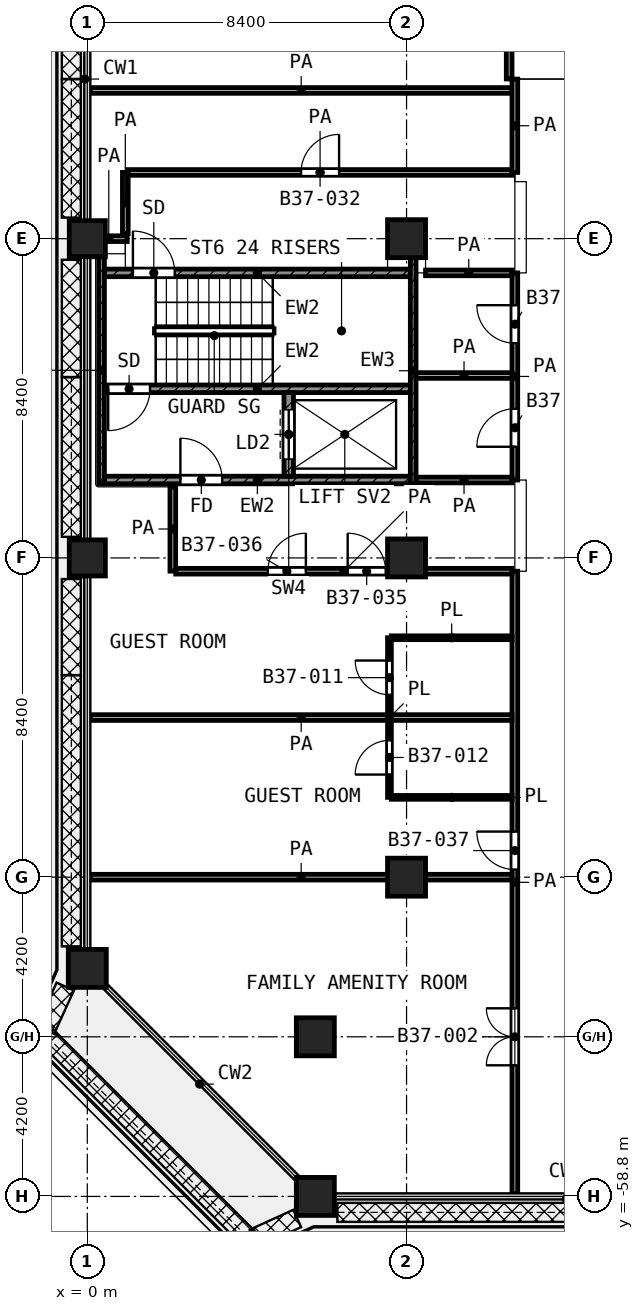
"""IFC4 building model, lengths in metres.
Left out: names, types, materials, properties, quantities, classifications, styles, units other than length and angle.
Written with IfcOpenShell. Run it as: python <this file> out.ifc"""

import sys

from ifc_helpers import new_model, si_unit, direction, frame, frame_2d, origin, origin_2d, place, context, subcontext, project, spatial, rectangle, extrude, element, fill, save


model = new_model("IFC4")
c1 = context("Model", 3, precision=1e-05, world=origin(), true_north=direction((0.0, 1.0)))
c2 = subcontext(c1, "Body", "Model", "MODEL_VIEW")
j1 = project(units=[si_unit("LENGTHUNIT", "METRE"), si_unit("PLANEANGLEUNIT", "RADIAN")], contexts=[c1])
p1 = place(None, origin())
s1 = spatial("IfcSite", under=j1, at=p1, CompositionType="ELEMENT")
p2 = place(p1, origin())
s2 = spatial("IfcBuilding", under=s1, at=p2, CompositionType="ELEMENT")
p3 = place(p2, frame((0.0, 0.0, 162.6)))
s3 = spatial("IfcBuildingStorey", under=s2, at=p3, CompositionType="ELEMENT", Elevation=162.6)
p4 = place(p3, frame((0.0, -33.6, 0.0), z_axis=(0.0, 0.0, 1.0), x_axis=(1.0, 0.0, 0.0)))
e1 = element("IfcColumn", 1, at=p4, inside=s3, PredefinedType="COLUMN", context=c2, shape_type="SweptSolid", body=[
    extrude(rectangle(XDim=0.95, YDim=0.95, at=origin_2d()), origin(), (0.0, 0.0, 1.0), 4.2),
])
p5 = place(p3, frame((8.4, -33.6, 0.0), z_axis=(0.0, 0.0, 1.0), x_axis=(1.0, 0.0, 0.0)))
e2 = element("IfcColumn", 2, at=p5, inside=s3, PredefinedType="COLUMN", context=c2, shape_type="SweptSolid", body=[
    extrude(rectangle(XDim=1.0, YDim=1.0, at=origin_2d()), origin(), (0.0, 0.0, 1.0), 4.2),
])
p6 = place(p3, frame((0.0, -42.0, 0.0), z_axis=(0.0, 0.0, 1.0), x_axis=(1.0, 0.0, 0.0)))
e3 = element("IfcColumn", 3, at=p6, inside=s3, PredefinedType="COLUMN", context=c2, shape_type="SweptSolid", body=[
    extrude(rectangle(XDim=0.95, YDim=0.95, at=origin_2d()), origin(), (0.0, 0.0, 1.0), 4.2),
])
for number, where, z_axis, x_axis in (
    (4, (8.4, -42.0, 0.0), (0.0, 0.0, 1.0), (1.0, 0.0, 0.0)),
    (5, (8.4, -50.4, 0.0), (0.0, 0.0, 1.0), (1.0, 0.0, 0.0)),
    (6, (0.0, -52.8, 0.0), (0.0, 0.0, 1.0), (1.0, 0.0, 0.0)),
    (7, (6.0, -54.6, 0.0), (0.0, 0.0, 1.0), (1.0, 0.0, 0.0)),
    (8, (6.0, -58.8, 0.0), (0.0, 0.0, 1.0), (1.0, 0.0, 0.0)),
):
    element("IfcColumn", number, at=place(p3, frame(where, z_axis=z_axis, x_axis=x_axis)), inside=s3, PredefinedType="COLUMN", context=c2, shape_type="SweptSolid", body=[
        extrude(rectangle(XDim=1.0, YDim=1.0, at=origin_2d()), origin(), (0.0, 0.0, 1.0), 4.2),
    ])
p7 = place(p3, frame((0.375, -40.05, 0.0), z_axis=(0.0, 0.0, 1.0), x_axis=(0.0, 1.0, 0.0)))
e9 = element("IfcWall", 9, at=p7, inside=s3, PredefinedType="SHEAR", context=c2, shape_type="SweptSolid", body=[
    extrude(rectangle(XDim=5.975, YDim=0.15, at=frame_2d((2.988, 0.0))), origin(), (0.0, 0.0, 1.0), 3.6),
])
p8 = place(p3, frame((8.575, -40.05, 0.0), z_axis=(0.0, 0.0, 1.0), x_axis=(0.0, 1.0, 0.0)))
e10 = element("IfcWall", 10, at=p8, inside=s3, PredefinedType="SHEAR", context=c2, shape_type="SweptSolid", body=[
    extrude(rectangle(XDim=5.95, YDim=0.15, at=frame_2d((2.975, 0.0))), origin(), (0.0, 0.0, 1.0), 3.6),
])
p9 = place(p3, frame((0.45, -34.5, 0.0), z_axis=(0.0, 0.0, 1.0), x_axis=(1.0, 0.0, 0.0)))
e11 = element("IfcWall", 11, at=p9, inside=s3, PredefinedType="SHEAR", context=c2, shape_type="SweptSolid", body=[
    extrude(rectangle(XDim=8.05, YDim=0.2, at=frame_2d((4.025, 0.0))), origin(), (0.0, 0.0, 1.0), 3.6),
])
p10 = place(p9, frame((0.75, 0.0, 0.0)))
e12 = element("IfcOpeningElement", 12, at=p10, cuts=e11, PredefinedType="OPENING", context=c2, shape_type="SweptSolid", body=[
    extrude(rectangle(XDim=1.1, YDim=2.1, at=frame_2d((0.55, 1.05))), frame((0.0, 0.11, 0.0), z_axis=(0.0, -1.0, 0.0), x_axis=(1.0, 0.0, 0.0)), (0.0, 0.0, 1.0), 0.22),
])
p11 = place(p3, frame((0.45, -37.55, 0.0), z_axis=(0.0, 0.0, 1.0), x_axis=(1.0, 0.0, 0.0)))
e13 = element("IfcWall", 13, at=p11, inside=s3, PredefinedType="SHEAR", context=c2, shape_type="SweptSolid", body=[
    extrude(rectangle(XDim=8.05, YDim=0.2, at=frame_2d((4.025, 0.0))), origin(), (0.0, 0.0, 1.0), 3.6),
])
p12 = place(p11, frame((0.1, 0.0, 0.0)))
e14 = element("IfcOpeningElement", 14, at=p12, cuts=e13, PredefinedType="OPENING", context=c2, shape_type="SweptSolid", body=[
    extrude(rectangle(XDim=1.1, YDim=2.1, at=frame_2d((0.55, 1.05))), frame((0.0, 0.11, 0.0), z_axis=(0.0, -1.0, 0.0), x_axis=(1.0, 0.0, 0.0)), (0.0, 0.0, 1.0), 0.22),
])
p13 = place(p3, frame((0.45, -39.95, 0.0), z_axis=(0.0, 0.0, 1.0), x_axis=(1.0, 0.0, 0.0)))
e15 = element("IfcWall", 15, at=p13, inside=s3, PredefinedType="SHEAR", context=c2, shape_type="SweptSolid", body=[
    extrude(rectangle(XDim=8.05, YDim=0.2, at=frame_2d((4.025, 0.0))), origin(), (0.0, 0.0, 1.0), 3.6),
])
p14 = place(p13, frame((2.0, 0.0, 0.0)))
e16 = element("IfcOpeningElement", 16, at=p14, cuts=e15, PredefinedType="OPENING", context=c2, shape_type="SweptSolid", body=[
    extrude(rectangle(XDim=1.1, YDim=2.1, at=frame_2d((0.55, 1.05))), frame((0.0, 0.11, 0.0), z_axis=(0.0, -1.0, 0.0), x_axis=(1.0, 0.0, 0.0)), (0.0, 0.0, 1.0), 0.22),
])
p15 = place(p3, frame((5.3, -39.85, 0.0), z_axis=(0.0, 0.0, 1.0), x_axis=(0.0, 1.0, 0.0)))
e17 = element("IfcWall", 17, at=p15, inside=s3, PredefinedType="SHEAR", context=c2, shape_type="SweptSolid", body=[
    extrude(rectangle(XDim=2.2, YDim=0.25, at=frame_2d((1.1, 0.0))), origin(), (0.0, 0.0, 1.0), 3.6),
])
p16 = place(p15, frame((0.45, 0.0, 0.0)))
e18 = element("IfcOpeningElement", 18, at=p16, cuts=e17, PredefinedType="OPENING", context=c2, shape_type="SweptSolid", body=[
    extrude(rectangle(XDim=1.3, YDim=2.1, at=frame_2d((0.65, 1.05))), frame((0.0, 0.135, 0.0), z_axis=(0.0, -1.0, 0.0), x_axis=(1.0, 0.0, 0.0)), (0.0, 0.0, 1.0), 0.27),
])
for number, where, z_axis, x_axis in (
    (19, (8.0, -48.3, 0.0), (0.0, 0.0, 1.0), (1.0, 0.0, 0.0)),
    (20, (8.0, -44.1, 0.0), (0.0, 0.0, 1.0), (1.0, 0.0, 0.0)),
):
    element("IfcWall", number, at=place(p3, frame(where, z_axis=z_axis, x_axis=x_axis)), inside=s3, PredefinedType="PARTITIONING", context=c2, shape_type="SweptSolid", body=[
        extrude(rectangle(XDim=3.175, YDim=0.1, at=frame_2d((1.587, 0.0))), origin(), (0.0, 0.0, 1.0), 3.6),
    ])
p17 = place(p3, frame((7.95, -48.3, 0.0), z_axis=(0.0, 0.0, 1.0), x_axis=(0.0, 1.0, 0.0)))
e21 = element("IfcWall", 21, at=p17, inside=s3, PredefinedType="PARTITIONING", context=c2, shape_type="SweptSolid", body=[
    extrude(rectangle(XDim=4.2, YDim=0.1, at=frame_2d((2.1, 0.0))), origin(), (0.0, 0.0, 1.0), 3.6),
])
p18 = place(p17, frame((2.7, 0.0, 0.0)))
e22 = element("IfcOpeningElement", 22, at=p18, cuts=e21, PredefinedType="OPENING", context=c2, shape_type="SweptSolid", body=[
    extrude(rectangle(XDim=0.9, YDim=2.1, at=frame_2d((0.45, 1.05))), frame((0.0, 0.06, 0.0), z_axis=(0.0, -1.0, 0.0), x_axis=(1.0, 0.0, 0.0)), (0.0, 0.0, 1.0), 0.12),
])
p19 = place(p17, frame((0.6, 0.0, 0.0)))
e23 = element("IfcOpeningElement", 23, at=p19, cuts=e21, PredefinedType="OPENING", context=c2, shape_type="SweptSolid", body=[
    extrude(rectangle(XDim=0.9, YDim=2.1, at=frame_2d((0.45, 1.05))), frame((0.0, 0.06, 0.0), z_axis=(0.0, -1.0, 0.0), x_axis=(1.0, 0.0, 0.0)), (0.0, 0.0, 1.0), 0.12),
])
for number, where, z_axis, x_axis in (
    (24, (0.08, -50.4, 0.0), (0.0, 0.0, 1.0), (1.0, 0.0, 0.0)),
    (25, (0.08, -46.2, 0.0), (0.0, 0.0, 1.0), (1.0, 0.0, 0.0)),
):
    element("IfcWall", number, at=place(p3, frame(where, z_axis=z_axis, x_axis=x_axis)), inside=s3, PredefinedType="PARTITIONING", context=c2, shape_type="SweptSolid", body=[
        extrude(rectangle(XDim=11.095, YDim=0.15, at=frame_2d((5.547, 0.0))), origin(), (0.0, 0.0, 1.0), 3.6),
    ])
p20 = place(p3, frame((2.327, -42.35, 0.0), z_axis=(0.0, 0.0, 1.0), x_axis=(1.0, 0.0, 0.0)))
e26 = element("IfcWall", 26, at=p20, inside=s3, PredefinedType="PARTITIONING", context=c2, shape_type="SweptSolid", body=[
    extrude(rectangle(XDim=8.848, YDim=0.15, at=frame_2d((4.424, 0.0))), origin(), (0.0, 0.0, 1.0), 3.6),
])
p21 = place(p20, frame((4.524, 0.0, 0.0)))
e27 = element("IfcOpeningElement", 27, at=p21, cuts=e26, PredefinedType="OPENING", context=c2, shape_type="SweptSolid", body=[
    extrude(rectangle(XDim=1.0, YDim=2.1, at=frame_2d((0.5, 1.05))), frame((0.0, 0.085, 0.0), z_axis=(0.0, -1.0, 0.0), x_axis=(1.0, 0.0, 0.0)), (0.0, 0.0, 1.0), 0.17),
])
p22 = place(p20, frame((2.424, 0.0, 0.0)))
e28 = element("IfcOpeningElement", 28, at=p22, cuts=e26, PredefinedType="OPENING", context=c2, shape_type="SweptSolid", body=[
    extrude(rectangle(XDim=1.0, YDim=2.1, at=frame_2d((0.5, 1.05))), frame((0.0, 0.085, 0.0), z_axis=(0.0, -1.0, 0.0), x_axis=(1.0, 0.0, 0.0)), (0.0, 0.0, 1.0), 0.17),
])
for number, where, z_axis, x_axis in (
    (29, (8.65, -39.95, 0.0), (0.0, 0.0, 1.0), (1.0, 0.0, 0.0)),
    (30, (8.65, -37.2, 0.0), (0.0, 0.0, 1.0), (1.0, 0.0, 0.0)),
):
    element("IfcWall", number, at=place(p3, frame(where, z_axis=z_axis, x_axis=x_axis)), inside=s3, PredefinedType="PARTITIONING", context=c2, shape_type="SweptSolid", body=[
        extrude(rectangle(XDim=2.525, YDim=0.15, at=frame_2d((1.263, 0.0))), origin(), (0.0, 0.0, 1.0), 3.6),
    ])
p23 = place(p3, frame((8.9, -34.5, 0.0), z_axis=(0.0, 0.0, 1.0), x_axis=(1.0, 0.0, 0.0)))
e31 = element("IfcWall", 31, at=p23, inside=s3, PredefinedType="PARTITIONING", context=c2, shape_type="SweptSolid", body=[
    extrude(rectangle(XDim=2.275, YDim=0.15, at=frame_2d((1.138, 0.0))), origin(), (0.0, 0.0, 1.0), 3.6),
])
p24 = place(p3, frame((0.08, -33.6, 0.0), z_axis=(0.0, 0.0, 1.0), x_axis=(1.0, 0.0, 0.0)))
e32 = element("IfcWall", 32, at=p24, inside=s3, PredefinedType="PARTITIONING", context=c2, shape_type="SweptSolid", body=[
    extrude(rectangle(XDim=0.97, YDim=0.15, at=frame_2d((0.485, 0.0))), origin(), (0.0, 0.0, 1.0), 3.6),
])
p25 = place(p3, frame((1.075, -31.857, 0.0), z_axis=(0.0, 0.0, 1.0), x_axis=(1.0, 0.0, 0.0)))
e33 = element("IfcWall", 33, at=p25, inside=s3, PredefinedType="PARTITIONING", context=c2, shape_type="SweptSolid", body=[
    extrude(rectangle(XDim=10.1, YDim=0.15, at=frame_2d((5.05, 0.0))), origin(), (0.0, 0.0, 1.0), 3.6),
])
p26 = place(p25, frame((4.55, 0.0, 0.0)))
e34 = element("IfcOpeningElement", 34, at=p26, cuts=e33, PredefinedType="OPENING", context=c2, shape_type="SweptSolid", body=[
    extrude(rectangle(XDim=1.0, YDim=2.1, at=frame_2d((0.5, 1.05))), frame((0.0, 0.085, 0.0), z_axis=(0.0, -1.0, 0.0), x_axis=(1.0, 0.0, 0.0)), (0.0, 0.0, 1.0), 0.17),
])
p27 = place(p3, frame((0.08, -29.7, 0.0), z_axis=(0.0, 0.0, 1.0), x_axis=(1.0, 0.0, 0.0)))
e35 = element("IfcWall", 35, at=p27, inside=s3, PredefinedType="PARTITIONING", context=c2, shape_type="SweptSolid", body=[
    extrude(rectangle(XDim=11.095, YDim=0.15, at=frame_2d((5.547, 0.0))), origin(), (0.0, 0.0, 1.0), 3.6),
])
p28 = place(p3, frame((1.0, -33.465, 0.0), z_axis=(0.0, 0.0, 1.0), x_axis=(0.0, 1.0, 0.0)))
e36 = element("IfcWall", 36, at=p28, inside=s3, PredefinedType="PARTITIONING", context=c2, shape_type="SweptSolid", body=[
    extrude(rectangle(XDim=1.608, YDim=0.15, at=frame_2d((0.804, 0.0))), origin(), (0.0, 0.0, 1.0), 3.6),
])
p29 = place(p3, frame((2.25, -42.348, 0.0), z_axis=(0.0, 0.0, 1.0), x_axis=(0.0, 1.0, 0.0)))
e37 = element("IfcWall", 37, at=p29, inside=s3, PredefinedType="PARTITIONING", context=c2, shape_type="SweptSolid", body=[
    extrude(rectangle(XDim=2.218, YDim=0.15, at=frame_2d((1.109, 0.0))), origin(), (0.0, 0.0, 1.0), 3.6),
])
p30 = place(p3, frame((11.1, -29.398, 0.0), z_axis=(0.0, 0.0, 1.0), x_axis=(0.0, 1.0, 0.0)))
e38 = element("IfcWall", 38, at=p30, inside=s3, PredefinedType="PARTITIONING", context=c2, shape_type="SweptSolid", body=[
    extrude(rectangle(XDim=4.498, YDim=0.15, at=frame_2d((2.249, 0.0))), origin(), (0.0, 0.0, 1.0), 3.6),
])
p31 = place(p30, frame((1.499, 0.0, 0.0)))
e39 = element("IfcOpeningElement", 39, at=p31, cuts=e38, PredefinedType="OPENING", context=c2, shape_type="SweptSolid", body=[
    extrude(rectangle(XDim=1.2, YDim=2.1, at=frame_2d((0.6, 1.05))), frame((0.0, 0.085, 0.0), z_axis=(0.0, -1.0, 0.0), x_axis=(1.0, 0.0, 0.0)), (0.0, 0.0, 1.0), 0.17),
])
p32 = place(p3, frame((11.25, -58.72, 0.0), z_axis=(0.0, 0.0, 1.0), x_axis=(0.0, 1.0, 0.0)))
e40 = element("IfcWall", 40, at=p32, inside=s3, PredefinedType="PARTITIONING", context=c2, shape_type="SweptSolid", body=[
    extrude(rectangle(XDim=16.37, YDim=0.15, at=frame_2d((8.185, 0.0))), origin(), (0.0, 0.0, 1.0), 3.6),
])
p33 = place(p32, frame((8.52, 0.0, 0.0)))
e41 = element("IfcOpeningElement", 41, at=p33, cuts=e40, PredefinedType="OPENING", context=c2, shape_type="SweptSolid", body=[
    extrude(rectangle(XDim=1.0, YDim=2.1, at=frame_2d((0.5, 1.05))), frame((0.0, 0.085, 0.0), z_axis=(0.0, -1.0, 0.0), x_axis=(1.0, 0.0, 0.0)), (0.0, 0.0, 1.0), 0.17),
])
p34 = place(p32, frame((3.37, 0.0, 0.0)))
e42 = element("IfcOpeningElement", 42, at=p34, cuts=e40, PredefinedType="OPENING", context=c2, shape_type="SweptSolid", body=[
    extrude(rectangle(XDim=1.5, YDim=2.1, at=frame_2d((0.75, 1.05))), frame((0.0, 0.085, 0.0), z_axis=(0.0, -1.0, 0.0), x_axis=(1.0, 0.0, 0.0)), (0.0, 0.0, 1.0), 0.17),
])
p35 = place(p3, frame((11.25, -39.95, 0.0), z_axis=(0.0, 0.0, 1.0), x_axis=(0.0, 1.0, 0.0)))
e43 = element("IfcWall", 43, at=p35, inside=s3, PredefinedType="PARTITIONING", context=c2, shape_type="SweptSolid", body=[
    extrude(rectangle(XDim=5.45, YDim=0.15, at=frame_2d((2.725, 0.0))), origin(), (0.0, 0.0, 1.0), 3.6),
])
p36 = place(p35, frame((3.6, 0.0, 0.0)))
e44 = element("IfcOpeningElement", 44, at=p36, cuts=e43, PredefinedType="OPENING", context=c2, shape_type="SweptSolid", body=[
    extrude(rectangle(XDim=1.0, YDim=2.1, at=frame_2d((0.5, 1.05))), frame((0.0, 0.085, 0.0), z_axis=(0.0, -1.0, 0.0), x_axis=(1.0, 0.0, 0.0)), (0.0, 0.0, 1.0), 0.17),
])
p37 = place(p35, frame((0.875, 0.0, 0.0)))
e45 = element("IfcOpeningElement", 45, at=p37, cuts=e43, PredefinedType="OPENING", context=c2, shape_type="SweptSolid", body=[
    extrude(rectangle(XDim=1.0, YDim=2.1, at=frame_2d((0.5, 1.05))), frame((0.0, 0.085, 0.0), z_axis=(0.0, -1.0, 0.0), x_axis=(1.0, 0.0, 0.0)), (0.0, 0.0, 1.0), 0.17),
])
p38 = place(p3, frame((11.25, -31.857, 0.0), z_axis=(0.0, 0.0, 1.0), x_axis=(0.0, 1.0, 0.0)))
e46 = element("IfcWall", 46, at=p38, inside=s3, PredefinedType="PARTITIONING", context=c2, shape_type="SweptSolid", body=[
    extrude(rectangle(XDim=2.457, YDim=0.15, at=frame_2d((1.229, 0.0))), origin(), (0.0, 0.0, 1.0), 3.6),
])
p39 = place(p10, origin())
e47 = element("IfcDoor", 47, at=p39, inside=s3, OperationType="SINGLE_SWING_LEFT", PredefinedType="DOOR", context=c2, shape_type="SweptSolid", body=[
    extrude(rectangle(XDim=1.1, YDim=2.1, at=frame_2d((0.55, 1.05))), frame((0.0, 0.025, 0.0), z_axis=(0.0, -1.0, 0.0), x_axis=(1.0, 0.0, 0.0)), (0.0, 0.0, 1.0), 0.05),
])
fill(e12, e47)
p40 = place(p12, frame((1.1, 0.0, 0.0), z_axis=(0.0, 0.0, 1.0), x_axis=(-1.0, 0.0, 0.0)))
e48 = element("IfcDoor", 48, at=p40, inside=s3, OperationType="SINGLE_SWING_LEFT", PredefinedType="DOOR", context=c2, shape_type="SweptSolid", body=[
    extrude(rectangle(XDim=1.1, YDim=2.1, at=frame_2d((0.55, 1.05))), frame((0.0, 0.025, 0.0), z_axis=(0.0, -1.0, 0.0), x_axis=(1.0, 0.0, 0.0)), (0.0, 0.0, 1.0), 0.05),
])
fill(e14, e48)
p41 = place(p16, origin())
e49 = element("IfcDoor", 49, at=p41, inside=s3, OperationType="DOUBLE_DOOR_SLIDING", PredefinedType="DOOR", context=c2, shape_type="SweptSolid", body=[
    extrude(rectangle(XDim=1.3, YDim=2.1, at=frame_2d((0.65, 1.05))), frame((0.0, 0.025, 0.0), z_axis=(0.0, -1.0, 0.0), x_axis=(1.0, 0.0, 0.0)), (0.0, 0.0, 1.0), 0.05),
])
fill(e18, e49)
p42 = place(p14, origin())
e50 = element("IfcDoor", 50, at=p42, inside=s3, OperationType="SINGLE_SWING_LEFT", PredefinedType="DOOR", context=c2, shape_type="SweptSolid", body=[
    extrude(rectangle(XDim=1.1, YDim=2.1, at=frame_2d((0.55, 1.05))), frame((0.0, 0.025, 0.0), z_axis=(0.0, -1.0, 0.0), x_axis=(1.0, 0.0, 0.0)), (0.0, 0.0, 1.0), 0.05),
])
fill(e16, e50)
p43 = place(p26, origin())
e51 = element("IfcDoor", 51, at=p43, inside=s3, OperationType="SINGLE_SWING_RIGHT", PredefinedType="DOOR", context=c2, shape_type="SweptSolid", body=[
    extrude(rectangle(XDim=1.0, YDim=2.1, at=frame_2d((0.5, 1.05))), frame((0.0, 0.025, 0.0), z_axis=(0.0, -1.0, 0.0), x_axis=(1.0, 0.0, 0.0)), (0.0, 0.0, 1.0), 0.05),
])
fill(e34, e51)
p44 = place(p36, origin())
e52 = element("IfcDoor", 52, at=p44, inside=s3, OperationType="SINGLE_SWING_RIGHT", PredefinedType="DOOR", context=c2, shape_type="SweptSolid", body=[
    extrude(rectangle(XDim=1.0, YDim=2.1, at=frame_2d((0.5, 1.05))), frame((0.0, 0.025, 0.0), z_axis=(0.0, -1.0, 0.0), x_axis=(1.0, 0.0, 0.0)), (0.0, 0.0, 1.0), 0.05),
])
fill(e44, e52)
p45 = place(p37, origin())
e53 = element("IfcDoor", 53, at=p45, inside=s3, OperationType="SINGLE_SWING_LEFT", PredefinedType="DOOR", context=c2, shape_type="SweptSolid", body=[
    extrude(rectangle(XDim=1.0, YDim=2.1, at=frame_2d((0.5, 1.05))), frame((0.0, 0.025, 0.0), z_axis=(0.0, -1.0, 0.0), x_axis=(1.0, 0.0, 0.0)), (0.0, 0.0, 1.0), 0.05),
])
fill(e45, e53)
p46 = place(p21, origin())
e54 = element("IfcDoor", 54, at=p46, inside=s3, OperationType="SINGLE_SWING_LEFT", PredefinedType="DOOR", context=c2, shape_type="SweptSolid", body=[
    extrude(rectangle(XDim=1.0, YDim=2.1, at=frame_2d((0.5, 1.05))), frame((0.0, 0.025, 0.0), z_axis=(0.0, -1.0, 0.0), x_axis=(1.0, 0.0, 0.0)), (0.0, 0.0, 1.0), 0.05),
])
fill(e27, e54)
p47 = place(p22, origin())
e55 = element("IfcDoor", 55, at=p47, inside=s3, OperationType="SINGLE_SWING_RIGHT", PredefinedType="DOOR", context=c2, shape_type="SweptSolid", body=[
    extrude(rectangle(XDim=1.0, YDim=2.1, at=frame_2d((0.5, 1.05))), frame((0.0, 0.025, 0.0), z_axis=(0.0, -1.0, 0.0), x_axis=(1.0, 0.0, 0.0)), (0.0, 0.0, 1.0), 0.05),
])
fill(e28, e55)
p48 = place(p18, origin())
e56 = element("IfcDoor", 56, at=p48, inside=s3, OperationType="SINGLE_SWING_RIGHT", PredefinedType="DOOR", context=c2, shape_type="SweptSolid", body=[
    extrude(rectangle(XDim=0.9, YDim=2.1, at=frame_2d((0.45, 1.05))), frame((0.0, 0.025, 0.0), z_axis=(0.0, -1.0, 0.0), x_axis=(1.0, 0.0, 0.0)), (0.0, 0.0, 1.0), 0.05),
])
fill(e22, e56)
p49 = place(p33, origin())
e57 = element("IfcDoor", 57, at=p49, inside=s3, OperationType="SINGLE_SWING_RIGHT", PredefinedType="DOOR", context=c2, shape_type="SweptSolid", body=[
    extrude(rectangle(XDim=1.0, YDim=2.1, at=frame_2d((0.5, 1.05))), frame((0.0, 0.025, 0.0), z_axis=(0.0, -1.0, 0.0), x_axis=(1.0, 0.0, 0.0)), (0.0, 0.0, 1.0), 0.05),
])
fill(e41, e57)
p50 = place(p19, origin())
e58 = element("IfcDoor", 58, at=p50, inside=s3, OperationType="SINGLE_SWING_LEFT", PredefinedType="DOOR", context=c2, shape_type="SweptSolid", body=[
    extrude(rectangle(XDim=0.9, YDim=2.1, at=frame_2d((0.45, 1.05))), frame((0.0, 0.025, 0.0), z_axis=(0.0, -1.0, 0.0), x_axis=(1.0, 0.0, 0.0)), (0.0, 0.0, 1.0), 0.05),
])
fill(e23, e58)
p51 = place(p34, origin())
e59 = element("IfcDoor", 59, at=p51, inside=s3, OperationType="DOUBLE_DOOR_SINGLE_SWING", PredefinedType="DOOR", context=c2, shape_type="SweptSolid", body=[
    extrude(rectangle(XDim=1.5, YDim=2.1, at=frame_2d((0.75, 1.05))), frame((0.0, 0.025, 0.0), z_axis=(0.0, -1.0, 0.0), x_axis=(1.0, 0.0, 0.0)), (0.0, 0.0, 1.0), 0.05),
])
fill(e42, e59)
save(model, sys.argv[1])
